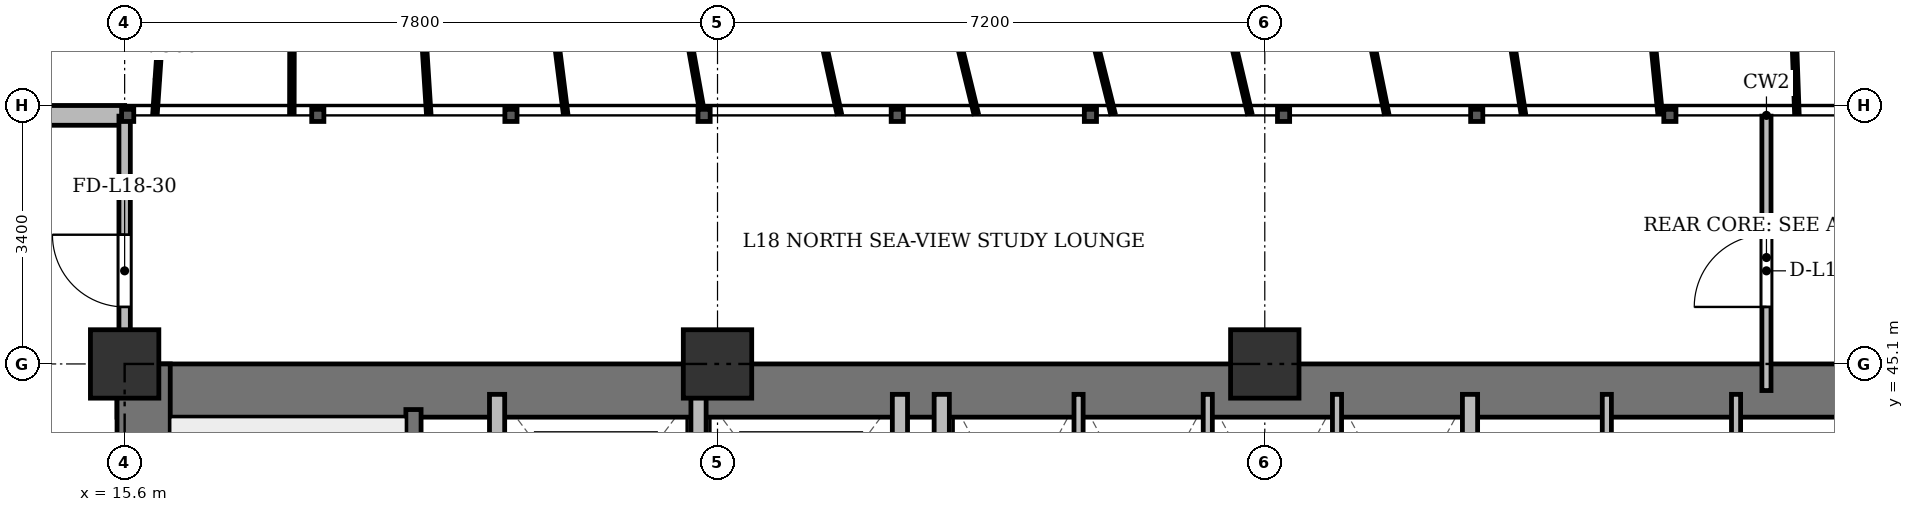
"""IFC4 building model, lengths in metres.
Left out: names, types, materials, properties, quantities, classifications, styles, units other than length and angle.
Written with IfcOpenShell. Run it as: python <this file> out.ifc"""

import sys

from ifc_helpers import new_model, si_unit, direction, frame, frame_2d, origin, origin_2d, place, context, subcontext, project, spatial, rectangle, extrude, source, transform, mapped, element, fill, save


model = new_model("IFC4")
c1 = context("Model", 3, precision=1e-05, world=origin(), true_north=direction((0.0, 1.0)))
c2 = subcontext(c1, "Body", "Model", "MODEL_VIEW")
j1 = project(units=[si_unit("LENGTHUNIT", "METRE"), si_unit("PLANEANGLEUNIT", "RADIAN")], contexts=[c1])
p1 = place(None, origin())
s1 = spatial("IfcSite", under=j1, at=p1, CompositionType="ELEMENT")
p2 = place(p1, origin())
s2 = spatial("IfcBuilding", under=s1, at=p2, CompositionType="ELEMENT")
p3 = place(p2, frame((0.0, 0.0, 70.3)))
s3 = spatial("IfcBuildingStorey", under=s2, at=p3, CompositionType="ELEMENT", Elevation=70.3)
m1 = source(origin(), c2, "Body", "SweptSolid", [
    extrude(rectangle(XDim=0.9, YDim=0.9, at=origin_2d()), origin(), (0.0, 0.0, 1.0), 3.6),
])
for number, where, z_axis, x_axis in (
    (1, (15.6, 45.1, 0.0), (0.0, 0.0, 1.0), (1.0, 0.0, 0.0)),
    (2, (23.4, 45.1, 0.0), (0.0, 0.0, 1.0), (1.0, 0.0, 0.0)),
    (3, (30.6, 45.1, 0.0), (0.0, 0.0, 1.0), (1.0, 0.0, 0.0)),
):
    element("IfcColumn", number, at=place(p3, frame(where, z_axis=z_axis, x_axis=x_axis)), inside=s3, PredefinedType="COLUMN", context=c2, shape_type="MappedRepresentation", body=[
        mapped(m1, transform((0.0, 0.0, 0.0), x_axis=(1.0, 0.0, 0.0), y_axis=(0.0, 1.0, 0.0), z_axis=(0.0, 0.0, 1.0), scale=1.0)),
    ])
p4 = place(p3, frame((7.6, 48.37, 0.0), z_axis=(0.0, 0.0, 1.0), x_axis=(1.0, 0.0, 0.0)))
e4 = element("IfcWall", 4, at=p4, inside=s3, PredefinedType="SOLIDWALL", context=c2, shape_type="SweptSolid", body=[
    extrude(rectangle(XDim=8.0, YDim=0.26, at=frame_2d((4.0, 0.0))), origin(), (0.0, 0.0, 1.0), 3.22),
])
p5 = place(p4, frame((0.768, 0.0, 0.9)))
e5 = element("IfcOpeningElement", 5, at=p5, cuts=e4, PredefinedType="OPENING", context=c2, shape_type="SweptSolid", body=[
    extrude(rectangle(XDim=1.2, YDim=1.65, at=frame_2d((0.6, 0.825))), frame((0.0, 0.14, 0.0), z_axis=(0.0, -1.0, 0.0), x_axis=(1.0, 0.0, 0.0)), (0.0, 0.0, 1.0), 0.28),
])
p6 = place(p4, frame((4.608, 0.0, 0.9)))
e6 = element("IfcOpeningElement", 6, at=p6, cuts=e4, PredefinedType="OPENING", context=c2, shape_type="SweptSolid", body=[
    extrude(rectangle(XDim=1.2, YDim=1.65, at=frame_2d((0.6, 0.825))), frame((0.0, 0.14, 0.0), z_axis=(0.0, -1.0, 0.0), x_axis=(1.0, 0.0, 0.0)), (0.0, 0.0, 1.0), 0.28),
])
p7 = place(p3, frame((15.5, 44.75, 0.0), z_axis=(0.0, 0.0, 1.0), x_axis=(1.0, 0.0, 0.0)))
e7 = element("IfcWall", 7, at=p7, inside=s3, PredefinedType="SHEAR", context=c2, shape_type="SweptSolid", body=[
    extrude(rectangle(XDim=43.4, YDim=0.7, at=frame_2d((21.7, 0.0))), origin(), (0.0, 0.0, 1.0), 3.22),
])
p8 = place(p3, frame((15.85, 33.4, 0.0), z_axis=(0.0, 0.0, 1.0), x_axis=(0.0, 1.0, 0.0)))
e8 = element("IfcWall", 8, at=p8, inside=s3, PredefinedType="SHEAR", context=c2, shape_type="SweptSolid", body=[
    extrude(rectangle(XDim=11.7, YDim=0.7, at=frame_2d((5.85, 0.0))), origin(), (0.0, 0.0, 1.0), 3.22),
])
p9 = place(p3, frame((19.4, 33.4, 0.0), z_axis=(0.0, 0.0, 1.0), x_axis=(0.0, 1.0, 0.0)))
e9 = element("IfcWall", 9, at=p9, inside=s3, PredefinedType="SHEAR", context=c2, shape_type="SweptSolid", body=[
    extrude(rectangle(XDim=11.1, YDim=0.2, at=frame_2d((5.55, 0.0))), origin(), (0.0, 0.0, 1.0), 3.22),
])
p10 = place(p9, frame((0.85, 0.0, 0.0)))
e10 = element("IfcOpeningElement", 10, at=p10, cuts=e9, PredefinedType="OPENING", context=c2, shape_type="SweptSolid", body=[
    extrude(rectangle(XDim=1.1, YDim=2.15, at=frame_2d((0.55, 1.075))), frame((0.0, 0.11, 0.0), z_axis=(0.0, -1.0, 0.0), x_axis=(1.0, 0.0, 0.0)), (0.0, 0.0, 1.0), 0.22),
])
for number, where, z_axis, x_axis in (
    (11, (20.5, 41.3, 0.0), (0.0, 0.0, 1.0), (0.0, 1.0, 0.0)),
    (12, (23.15, 41.3, 0.0), (0.0, 0.0, 1.0), (0.0, 1.0, 0.0)),
    (13, (25.8, 41.3, 0.0), (0.0, 0.0, 1.0), (0.0, 1.0, 0.0)),
):
    element("IfcWall", number, at=place(p3, frame(where, z_axis=z_axis, x_axis=x_axis)), inside=s3, PredefinedType="SOLIDWALL", context=c2, shape_type="SweptSolid", body=[
        extrude(rectangle(XDim=3.4, YDim=0.2, at=frame_2d((1.7, 0.0))), origin(), (0.0, 0.0, 1.0), 3.22),
    ])
p11 = place(p3, frame((26.35, 33.4, 0.0), z_axis=(0.0, 0.0, 1.0), x_axis=(0.0, 1.0, 0.0)))
e14 = element("IfcWall", 14, at=p11, inside=s3, PredefinedType="SOLIDWALL", context=c2, shape_type="SweptSolid", body=[
    extrude(rectangle(XDim=11.3, YDim=0.2, at=frame_2d((5.65, 0.0))), origin(), (0.0, 0.0, 1.0), 2.57),
])
p12 = place(p3, frame((33.3, 41.5, 0.0), z_axis=(0.0, 0.0, 1.0), x_axis=(0.0, 1.0, 0.0)))
e15 = element("IfcWall", 15, at=p12, inside=s3, PredefinedType="SOLIDWALL", context=c2, shape_type="SweptSolid", body=[
    extrude(rectangle(XDim=3.2, YDim=0.2, at=frame_2d((1.6, 0.0))), origin(), (0.0, 0.0, 1.0), 3.22),
])
for number, where, z_axis, x_axis in (
    (16, (28.15, 41.5, 0.0), (0.0, 0.0, 1.0), (0.0, 1.0, 0.0)),
    (17, (29.85, 41.5, 0.0), (0.0, 0.0, 1.0), (0.0, 1.0, 0.0)),
    (18, (31.55, 41.5, 0.0), (0.0, 0.0, 1.0), (0.0, 1.0, 0.0)),
    (19, (35.1, 41.5, 0.0), (0.0, 0.0, 1.0), (0.0, 1.0, 0.0)),
    (20, (36.8, 41.5, 0.0), (0.0, 0.0, 1.0), (0.0, 1.0, 0.0)),
):
    element("IfcWall", number, at=place(p3, frame(where, z_axis=z_axis, x_axis=x_axis)), inside=s3, PredefinedType="PARTITIONING", context=c2, shape_type="SweptSolid", body=[
        extrude(rectangle(XDim=3.2, YDim=0.12, at=frame_2d((1.6, 0.0))), origin(), (0.0, 0.0, 1.0), 3.22),
    ])
p13 = place(p3, frame((37.2, 44.75, 0.0), z_axis=(0.0, 0.0, 1.0), x_axis=(0.0, 1.0, 0.0)))
e21 = element("IfcWall", 21, at=p13, inside=s3, PredefinedType="PARTITIONING", context=c2, shape_type="SweptSolid", body=[
    extrude(rectangle(XDim=3.61, YDim=0.12, at=frame_2d((1.805, 0.0))), origin(), (0.0, 0.0, 1.0), 2.57),
])
p14 = place(p13, frame((1.1, 0.0, 0.0)))
e22 = element("IfcOpeningElement", 22, at=p14, cuts=e21, PredefinedType="OPENING", context=c2, shape_type="SweptSolid", body=[
    extrude(rectangle(XDim=0.95, YDim=2.15, at=frame_2d((0.475, 1.075))), frame((0.0, 0.07, 0.0), z_axis=(0.0, -1.0, 0.0), x_axis=(1.0, 0.0, 0.0)), (0.0, 0.0, 1.0), 0.14),
])
p15 = place(p3, frame((15.6, 44.75, 0.0), z_axis=(0.0, 0.0, 1.0), x_axis=(0.0, 1.0, 0.0)))
e23 = element("IfcWall", 23, at=p15, inside=s3, PredefinedType="PARTITIONING", context=c2, shape_type="SweptSolid", body=[
    extrude(rectangle(XDim=3.61, YDim=0.15, at=frame_2d((1.805, 0.0))), origin(), (0.0, 0.0, 1.0), 2.632),
])
p16 = place(p15, frame((1.1, 0.0, 0.0)))
e24 = element("IfcOpeningElement", 24, at=p16, cuts=e23, PredefinedType="OPENING", context=c2, shape_type="SweptSolid", body=[
    extrude(rectangle(XDim=0.95, YDim=2.15, at=frame_2d((0.475, 1.075))), frame((0.0, 0.085, 0.0), z_axis=(0.0, -1.0, 0.0), x_axis=(1.0, 0.0, 0.0)), (0.0, 0.0, 1.0), 0.17),
])
m2 = source(origin(), c2, "Body", "SweptSolid", [
    extrude(rectangle(XDim=0.95, YDim=2.15, at=frame_2d((0.475, 1.075))), frame((0.0, 0.025, 0.0), z_axis=(0.0, -1.0, 0.0), x_axis=(1.0, 0.0, 0.0)), (0.0, 0.0, 1.0), 0.05),
])
p17 = place(p14, origin())
e25 = element("IfcDoor", 25, at=p17, inside=s3, OperationType="SINGLE_SWING_LEFT", PredefinedType="DOOR", context=c2, shape_type="MappedRepresentation", body=[
    mapped(m2, transform((0.0, 0.0, 0.0), x_axis=(1.0, 0.0, 0.0), y_axis=(0.0, 1.0, 0.0), z_axis=(0.0, 0.0, 1.0), scale=1.0)),
])
fill(e22, e25)
p18 = place(p16, origin())
e26 = element("IfcDoor", 26, at=p18, inside=s3, OperationType="SINGLE_SWING_RIGHT", PredefinedType="DOOR", context=c2, shape_type="MappedRepresentation", body=[
    mapped(m2, transform((0.0, 0.0, 0.0), x_axis=(1.0, 0.0, 0.0), y_axis=(0.0, 1.0, 0.0), z_axis=(0.0, 0.0, 1.0), scale=1.0)),
])
fill(e24, e26)
save(model, sys.argv[1])
